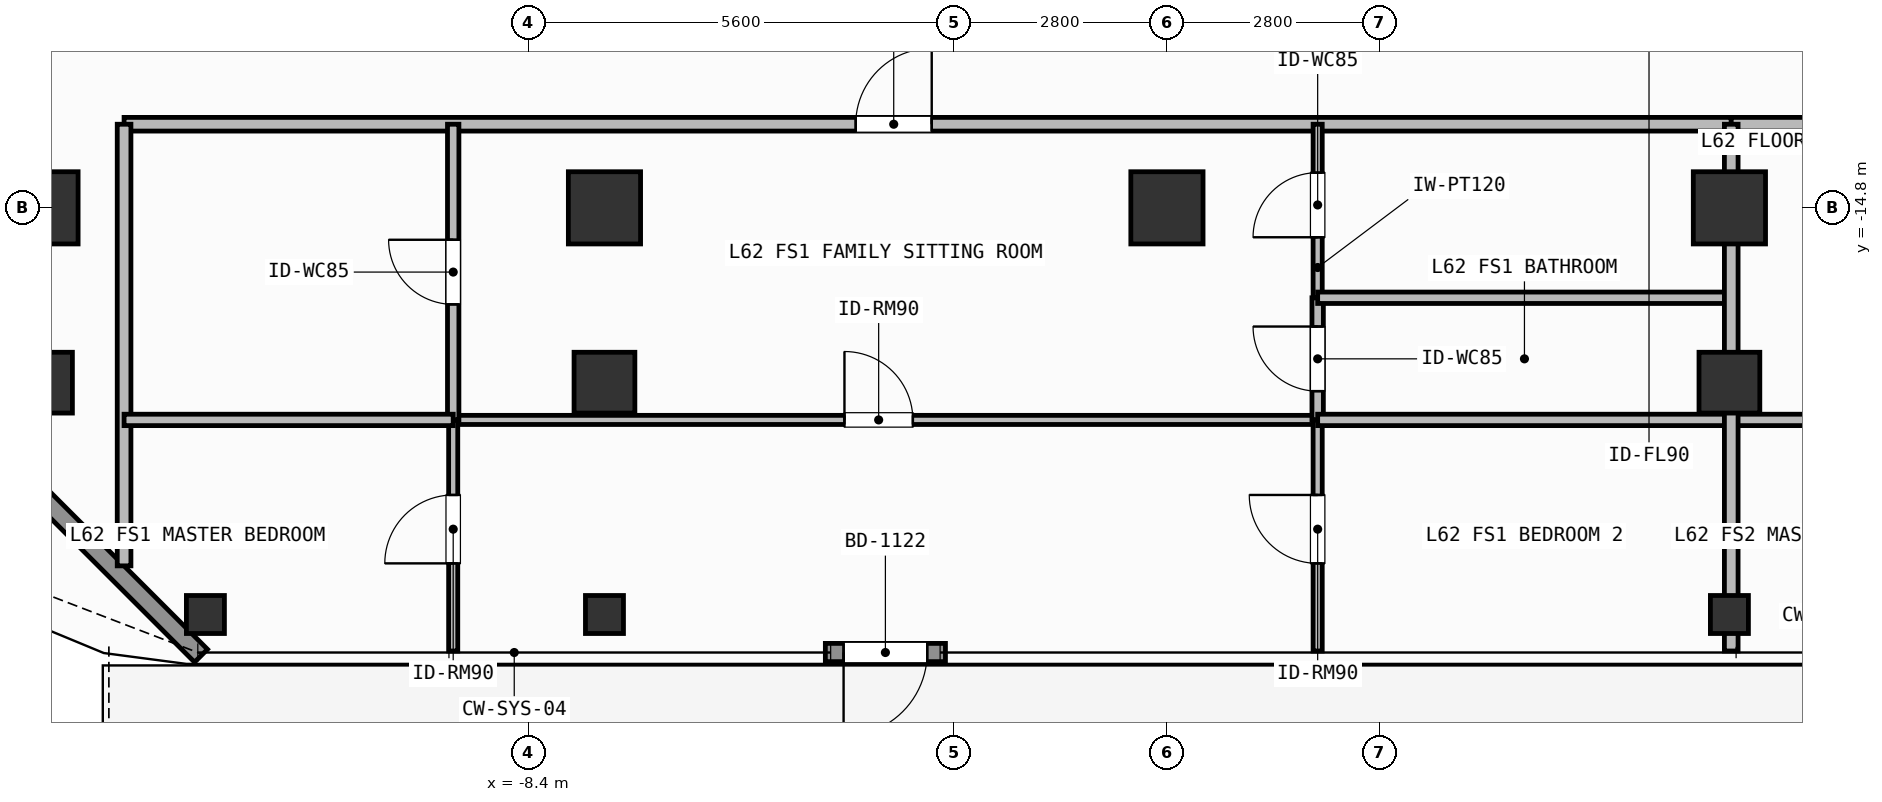
"""IFC4 building model, lengths in metres.
Left out: names, types, materials, properties, quantities, classifications, styles, units other than length and angle.
Written with IfcOpenShell. Run it as: python <this file> out.ifc"""

import sys

from ifc_helpers import new_model, si_unit, direction, frame, frame_2d, origin, origin_2d, place, context, subcontext, project, spatial, rectangle, hollow_rectangle, extrude, element, fill, save


model = new_model("IFC4")
c1 = context("Model", 3, precision=1e-05, world=origin(), true_north=direction((0.0, 1.0)))
c2 = subcontext(c1, "Body", "Model", "MODEL_VIEW")
j1 = project(units=[si_unit("LENGTHUNIT", "METRE"), si_unit("PLANEANGLEUNIT", "RADIAN")], contexts=[c1])
p1 = place(None, origin())
s1 = spatial("IfcSite", under=j1, at=p1, CompositionType="ELEMENT")
p2 = place(p1, origin())
s2 = spatial("IfcBuilding", under=s1, at=p2, CompositionType="ELEMENT")
p3 = place(p2, frame((0.0, 0.0, 254.7)))
s3 = spatial("IfcBuildingStorey", under=s2, at=p3, CompositionType="ELEMENT", Elevation=254.7)
for number, where, z_axis, x_axis in (
    (1, (-14.8, -14.8, 0.0), (0.0, 0.0, 1.0), (1.0, 0.0, 0.0)),
    (2, (-7.4, -14.8, 0.0), (0.0, 0.0, 1.0), (1.0, 0.0, 0.0)),
    (3, (0.0, -14.8, 0.0), (0.0, 0.0, 1.0), (1.0, 0.0, 0.0)),
    (4, (7.4, -14.8, 0.0), (0.0, 0.0, 1.0), (1.0, 0.0, 0.0)),
):
    element("IfcColumn", number, at=place(p3, frame(where, z_axis=z_axis, x_axis=x_axis)), inside=s3, PredefinedType="COLUMN", context=c2, shape_type="SweptSolid", body=[
        extrude(rectangle(XDim=0.95, YDim=0.95, at=origin_2d()), origin(), (0.0, 0.0, 1.0), 3.9),
    ])
for number, where, z_axis, x_axis in (
    (5, (-14.8, -17.1, 0.0), (0.0, 0.0, 1.0), (1.0, 0.0, 0.0)),
    (6, (-7.4, -17.1, 0.0), (0.0, 0.0, 1.0), (1.0, 0.0, 0.0)),
    (7, (7.4, -17.1, 0.0), (0.0, 0.0, 1.0), (1.0, 0.0, 0.0)),
):
    element("IfcColumn", number, at=place(p3, frame(where, z_axis=z_axis, x_axis=x_axis)), inside=s3, PredefinedType="COLUMN", context=c2, shape_type="SweptSolid", body=[
        extrude(hollow_rectangle(XDim=0.8, YDim=0.8, WallThickness=0.036, at=origin_2d()), origin(), (0.0, 0.0, 1.0), 3.9),
    ])
for number, where, z_axis, x_axis in (
    (8, (-12.65, -20.15, 0.0), (0.0, 0.0, 1.0), (1.0, 0.0, 0.0)),
    (9, (-7.4, -20.15, 0.0), (0.0, 0.0, 1.0), (1.0, 0.0, 0.0)),
    (10, (7.4, -20.15, 0.0), (0.0, 0.0, 1.0), (1.0, 0.0, 0.0)),
):
    element("IfcColumn", number, at=place(p3, frame(where, z_axis=z_axis, x_axis=x_axis)), inside=s3, PredefinedType="COLUMN", context=c2, shape_type="SweptSolid", body=[
        extrude(hollow_rectangle(XDim=0.5, YDim=0.5, WallThickness=0.025, at=origin_2d()), origin(), (0.0, 0.0, 1.0), 3.9),
    ])
p4 = place(p3, frame((-2.914, -20.65, 0.0), z_axis=(0.0, 0.0, 1.0), x_axis=(-1.0, 0.0, 0.0)))
e11 = element("IfcWall", 11, at=p4, inside=s3, PredefinedType="SOLIDWALL", context=c2, shape_type="SweptSolid", body=[
    extrude(rectangle(XDim=1.58, YDim=0.24, at=frame_2d((0.79, 0.0))), origin(), (0.0, 0.0, 1.0), 3.68),
])
p5 = place(p4, frame((0.24, 0.0, 0.0)))
e12 = element("IfcOpeningElement", 12, at=p5, cuts=e11, PredefinedType="OPENING", context=c2, shape_type="SweptSolid", body=[
    extrude(rectangle(XDim=1.1, YDim=2.2, at=frame_2d((0.55, 1.1))), frame((0.0, 0.13, 0.0), z_axis=(0.0, -1.0, 0.0), x_axis=(1.0, 0.0, 0.0)), (0.0, 0.0, 1.0), 0.26),
])
p6 = place(p3, frame((-12.708, -20.692, 0.0), z_axis=(0.0, 0.0, 1.0), x_axis=(-0.707126925818, 0.707086635981, 0.0)))
e13 = element("IfcWall", 13, at=p6, inside=s3, PredefinedType="SOLIDWALL", context=c2, shape_type="SweptSolid", body=[
    extrude(rectangle(XDim=6.06, YDim=0.24, at=frame_2d((3.03, 0.0))), origin(), (0.0, 0.0, 1.0), 3.68),
])
p7 = place(p3, frame((-13.72, -13.7, 0.0), z_axis=(0.0, 0.0, 1.0), x_axis=(1.0, 0.0, 0.0)))
e14 = element("IfcWall", 14, at=p7, inside=s3, PredefinedType="PARTITIONING", context=c2, shape_type="SweptSolid", body=[
    extrude(rectangle(XDim=21.144, YDim=0.18, at=frame_2d((10.572, 0.0))), origin(), (0.0, 0.0, 1.0), 3.68),
])
p8 = place(p7, frame((9.625, 0.0, 0.0)))
e15 = element("IfcOpeningElement", 15, at=p8, cuts=e14, PredefinedType="OPENING", context=c2, shape_type="SweptSolid", body=[
    extrude(rectangle(XDim=1.0, YDim=2.2, at=frame_2d((0.5, 1.1))), frame((0.0, 0.1, 0.0), z_axis=(0.0, -1.0, 0.0), x_axis=(1.0, 0.0, 0.0)), (0.0, 0.0, 1.0), 0.2),
])
p9 = place(p3, frame((-9.39, -17.59, 0.0), z_axis=(0.0, 0.0, 1.0), x_axis=(1.0, 0.0, 0.0)))
e16 = element("IfcWall", 16, at=p9, inside=s3, PredefinedType="PARTITIONING", context=c2, shape_type="SweptSolid", body=[
    extrude(rectangle(XDim=11.373, YDim=0.12, at=frame_2d((5.687, 0.0))), origin(), (0.0, 0.0, 1.0), 3.68),
])
p10 = place(p9, frame((5.147, 0.0, 0.0)))
e17 = element("IfcOpeningElement", 17, at=p10, cuts=e16, PredefinedType="OPENING", context=c2, shape_type="SweptSolid", body=[
    extrude(rectangle(XDim=0.9, YDim=2.1, at=frame_2d((0.45, 1.05))), frame((0.0, 0.07, 0.0), z_axis=(0.0, -1.0, 0.0), x_axis=(1.0, 0.0, 0.0)), (0.0, 0.0, 1.0), 0.14),
])
p11 = place(p3, frame((-9.39, -17.59, 0.0), z_axis=(0.0, 0.0, 1.0), x_axis=(0.0, 1.0, 0.0)))
e18 = element("IfcWall", 18, at=p11, inside=s3, PredefinedType="PARTITIONING", context=c2, shape_type="SweptSolid", body=[
    extrude(rectangle(XDim=3.89, YDim=0.15, at=frame_2d((1.945, 0.0))), origin(), (0.0, 0.0, 1.0), 3.68),
])
p12 = place(p11, frame((1.52, 0.0, 0.0)))
e19 = element("IfcOpeningElement", 19, at=p12, cuts=e18, PredefinedType="OPENING", context=c2, shape_type="SweptSolid", body=[
    extrude(rectangle(XDim=0.85, YDim=2.1, at=frame_2d((0.425, 1.05))), frame((0.0, 0.085, 0.0), z_axis=(0.0, -1.0, 0.0), x_axis=(1.0, 0.0, 0.0)), (0.0, 0.0, 1.0), 0.17),
])
p13 = place(p3, frame((-9.39, -20.63, 0.0), z_axis=(0.0, 0.0, 1.0), x_axis=(0.0, 1.0, 0.0)))
e20 = element("IfcWall", 20, at=p13, inside=s3, PredefinedType="PARTITIONING", context=c2, shape_type="SweptSolid", body=[
    extrude(rectangle(XDim=3.04, YDim=0.12, at=frame_2d((1.52, 0.0))), origin(), (0.0, 0.0, 1.0), 3.68),
])
p14 = place(p13, frame((1.153, 0.0, 0.0)))
e21 = element("IfcOpeningElement", 21, at=p14, cuts=e20, PredefinedType="OPENING", context=c2, shape_type="SweptSolid", body=[
    extrude(rectangle(XDim=0.9, YDim=2.1, at=frame_2d((0.45, 1.05))), frame((0.0, 0.07, 0.0), z_axis=(0.0, -1.0, 0.0), x_axis=(1.0, 0.0, 0.0)), (0.0, 0.0, 1.0), 0.14),
])
p15 = place(p3, frame((1.983, -17.59, 0.0), z_axis=(0.0, 0.0, 1.0), x_axis=(0.0, 1.0, 0.0)))
e22 = element("IfcWall", 22, at=p15, inside=s3, PredefinedType="PARTITIONING", context=c2, shape_type="SweptSolid", body=[
    extrude(rectangle(XDim=1.607, YDim=0.15, at=frame_2d((0.804, 0.0))), origin(), (0.0, 0.0, 1.0), 3.68),
])
p16 = place(p15, frame((0.378, 0.0, 0.0)))
e23 = element("IfcOpeningElement", 23, at=p16, cuts=e22, PredefinedType="OPENING", context=c2, shape_type="SweptSolid", body=[
    extrude(rectangle(XDim=0.85, YDim=2.1, at=frame_2d((0.425, 1.05))), frame((0.0, 0.085, 0.0), z_axis=(0.0, -1.0, 0.0), x_axis=(1.0, 0.0, 0.0)), (0.0, 0.0, 1.0), 0.17),
])
p17 = place(p3, frame((1.983, -15.983, 0.0), z_axis=(0.0, 0.0, 1.0), x_axis=(0.0, 1.0, 0.0)))
e24 = element("IfcWall", 24, at=p17, inside=s3, PredefinedType="PARTITIONING", context=c2, shape_type="SweptSolid", body=[
    extrude(rectangle(XDim=2.283, YDim=0.12, at=frame_2d((1.142, 0.0))), origin(), (0.0, 0.0, 1.0), 3.68),
])
p18 = place(p17, frame((0.796, 0.0, 0.0)))
e25 = element("IfcOpeningElement", 25, at=p18, cuts=e24, PredefinedType="OPENING", context=c2, shape_type="SweptSolid", body=[
    extrude(rectangle(XDim=0.85, YDim=2.1, at=frame_2d((0.425, 1.05))), frame((0.0, 0.07, 0.0), z_axis=(0.0, -1.0, 0.0), x_axis=(1.0, 0.0, 0.0)), (0.0, 0.0, 1.0), 0.14),
])
p19 = place(p3, frame((1.983, -20.63, 0.0), z_axis=(0.0, 0.0, 1.0), x_axis=(0.0, 1.0, 0.0)))
e26 = element("IfcWall", 26, at=p19, inside=s3, PredefinedType="PARTITIONING", context=c2, shape_type="SweptSolid", body=[
    extrude(rectangle(XDim=3.04, YDim=0.12, at=frame_2d((1.52, 0.0))), origin(), (0.0, 0.0, 1.0), 3.68),
])
p20 = place(p19, frame((1.153, 0.0, 0.0)))
e27 = element("IfcOpeningElement", 27, at=p20, cuts=e26, PredefinedType="OPENING", context=c2, shape_type="SweptSolid", body=[
    extrude(rectangle(XDim=0.9, YDim=2.1, at=frame_2d((0.45, 1.05))), frame((0.0, 0.07, 0.0), z_axis=(0.0, -1.0, 0.0), x_axis=(1.0, 0.0, 0.0)), (0.0, 0.0, 1.0), 0.14),
])
p21 = place(p3, frame((7.424, -13.7, 0.0), z_axis=(0.0, 0.0, 1.0), x_axis=(1.0, 0.0, 0.0)))
e28 = element("IfcWall", 28, at=p21, inside=s3, PredefinedType="PARTITIONING", context=c2, shape_type="SweptSolid", body=[
    extrude(rectangle(XDim=14.096, YDim=0.18, at=frame_2d((7.048, 0.0))), origin(), (0.0, 0.0, 1.0), 3.68),
])
p22 = place(p21, frame((5.738, 0.0, 0.0)))
e29 = element("IfcOpeningElement", 29, at=p22, cuts=e28, PredefinedType="OPENING", context=c2, shape_type="SweptSolid", body=[
    extrude(rectangle(XDim=1.0, YDim=2.2, at=frame_2d((0.5, 1.1))), frame((0.0, 0.1, 0.0), z_axis=(0.0, -1.0, 0.0), x_axis=(1.0, 0.0, 0.0)), (0.0, 0.0, 1.0), 0.2),
])
p23 = place(p3, frame((-13.72, -19.51, 0.0), z_axis=(0.0, 0.0, 1.0), x_axis=(0.0, 1.0, 0.0)))
e30 = element("IfcWall", 30, at=p23, inside=s3, PredefinedType="PARTITIONING", context=c2, shape_type="SweptSolid", body=[
    extrude(rectangle(XDim=5.81, YDim=0.18, at=frame_2d((2.905, 0.0))), origin(), (0.0, 0.0, 1.0), 3.68),
])
p24 = place(p3, frame((-13.72, -17.59, 0.0), z_axis=(0.0, 0.0, 1.0), x_axis=(1.0, 0.0, 0.0)))
e31 = element("IfcWall", 31, at=p24, inside=s3, PredefinedType="PARTITIONING", context=c2, shape_type="SweptSolid", body=[
    extrude(rectangle(XDim=4.33, YDim=0.15, at=frame_2d((2.165, 0.0))), origin(), (0.0, 0.0, 1.0), 3.68),
])
for number, where, z_axis, x_axis in (
    (32, (1.983, -15.983, 0.0), (0.0, 0.0, 1.0), (1.0, 0.0, 0.0)),
    (33, (1.983, -17.59, 0.0), (0.0, 0.0, 1.0), (1.0, 0.0, 0.0)),
):
    element("IfcWall", number, at=place(p3, frame(where, z_axis=z_axis, x_axis=x_axis)), inside=s3, PredefinedType="PARTITIONING", context=c2, shape_type="SweptSolid", body=[
        extrude(rectangle(XDim=5.441, YDim=0.15, at=frame_2d((2.721, 0.0))), origin(), (0.0, 0.0, 1.0), 3.68),
    ])
p25 = place(p3, frame((7.424, -17.59, 0.0), z_axis=(0.0, 0.0, 1.0), x_axis=(1.0, 0.0, 0.0)))
e34 = element("IfcWall", 34, at=p25, inside=s3, PredefinedType="PARTITIONING", context=c2, shape_type="SweptSolid", body=[
    extrude(rectangle(XDim=4.26, YDim=0.15, at=frame_2d((2.13, 0.0))), origin(), (0.0, 0.0, 1.0), 3.68),
])
p26 = place(p3, frame((7.424, -20.63, 0.0), z_axis=(0.0, 0.0, 1.0), x_axis=(0.0, 1.0, 0.0)))
e35 = element("IfcWall", 35, at=p26, inside=s3, PredefinedType="PARTITIONING", context=c2, shape_type="SweptSolid", body=[
    extrude(rectangle(XDim=6.93, YDim=0.18, at=frame_2d((3.465, 0.0))), origin(), (0.0, 0.0, 1.0), 3.182),
])
p27 = place(p5, origin())
e36 = element("IfcDoor", 36, at=p27, inside=s3, OperationType="SINGLE_SWING_RIGHT", PredefinedType="DOOR", context=c2, shape_type="SweptSolid", body=[
    extrude(rectangle(XDim=1.1, YDim=2.2, at=frame_2d((0.55, 1.1))), frame((0.0, 0.025, 0.0), z_axis=(0.0, -1.0, 0.0), x_axis=(1.0, 0.0, 0.0)), (0.0, 0.0, 1.0), 0.05),
])
fill(e12, e36)
p28 = place(p8, origin())
e37 = element("IfcDoor", 37, at=p28, inside=s3, OperationType="SINGLE_SWING_RIGHT", PredefinedType="DOOR", context=c2, shape_type="SweptSolid", body=[
    extrude(rectangle(XDim=1.0, YDim=2.2, at=frame_2d((0.5, 1.1))), frame((0.0, 0.025, 0.0), z_axis=(0.0, -1.0, 0.0), x_axis=(1.0, 0.0, 0.0)), (0.0, 0.0, 1.0), 0.05),
])
fill(e15, e37)
p29 = place(p10, origin())
e38 = element("IfcDoor", 38, at=p29, inside=s3, OperationType="SINGLE_SWING_LEFT", PredefinedType="DOOR", context=c2, shape_type="SweptSolid", body=[
    extrude(rectangle(XDim=0.9, YDim=2.1, at=frame_2d((0.45, 1.05))), frame((0.0, 0.025, 0.0), z_axis=(0.0, -1.0, 0.0), x_axis=(1.0, 0.0, 0.0)), (0.0, 0.0, 1.0), 0.05),
])
fill(e17, e38)
p30 = place(p12, origin())
e39 = element("IfcDoor", 39, at=p30, inside=s3, OperationType="SINGLE_SWING_RIGHT", PredefinedType="DOOR", context=c2, shape_type="SweptSolid", body=[
    extrude(rectangle(XDim=0.85, YDim=2.1, at=frame_2d((0.425, 1.05))), frame((0.0, 0.025, 0.0), z_axis=(0.0, -1.0, 0.0), x_axis=(1.0, 0.0, 0.0)), (0.0, 0.0, 1.0), 0.05),
])
fill(e19, e39)
p31 = place(p14, origin())
e40 = element("IfcDoor", 40, at=p31, inside=s3, OperationType="SINGLE_SWING_LEFT", PredefinedType="DOOR", context=c2, shape_type="SweptSolid", body=[
    extrude(rectangle(XDim=0.9, YDim=2.1, at=frame_2d((0.45, 1.05))), frame((0.0, 0.025, 0.0), z_axis=(0.0, -1.0, 0.0), x_axis=(1.0, 0.0, 0.0)), (0.0, 0.0, 1.0), 0.05),
])
fill(e21, e40)
p32 = place(p16, origin())
e41 = element("IfcDoor", 41, at=p32, inside=s3, OperationType="SINGLE_SWING_RIGHT", PredefinedType="DOOR", context=c2, shape_type="SweptSolid", body=[
    extrude(rectangle(XDim=0.85, YDim=2.1, at=frame_2d((0.425, 1.05))), frame((0.0, 0.025, 0.0), z_axis=(0.0, -1.0, 0.0), x_axis=(1.0, 0.0, 0.0)), (0.0, 0.0, 1.0), 0.05),
])
fill(e23, e41)
p33 = place(p18, origin())
e42 = element("IfcDoor", 42, at=p33, inside=s3, OperationType="SINGLE_SWING_LEFT", PredefinedType="DOOR", context=c2, shape_type="SweptSolid", body=[
    extrude(rectangle(XDim=0.85, YDim=2.1, at=frame_2d((0.425, 1.05))), frame((0.0, 0.025, 0.0), z_axis=(0.0, -1.0, 0.0), x_axis=(1.0, 0.0, 0.0)), (0.0, 0.0, 1.0), 0.05),
])
fill(e25, e42)
p34 = place(p20, origin())
e43 = element("IfcDoor", 43, at=p34, inside=s3, OperationType="SINGLE_SWING_RIGHT", PredefinedType="DOOR", context=c2, shape_type="SweptSolid", body=[
    extrude(rectangle(XDim=0.9, YDim=2.1, at=frame_2d((0.45, 1.05))), frame((0.0, 0.025, 0.0), z_axis=(0.0, -1.0, 0.0), x_axis=(1.0, 0.0, 0.0)), (0.0, 0.0, 1.0), 0.05),
])
fill(e27, e43)
save(model, sys.argv[1])
